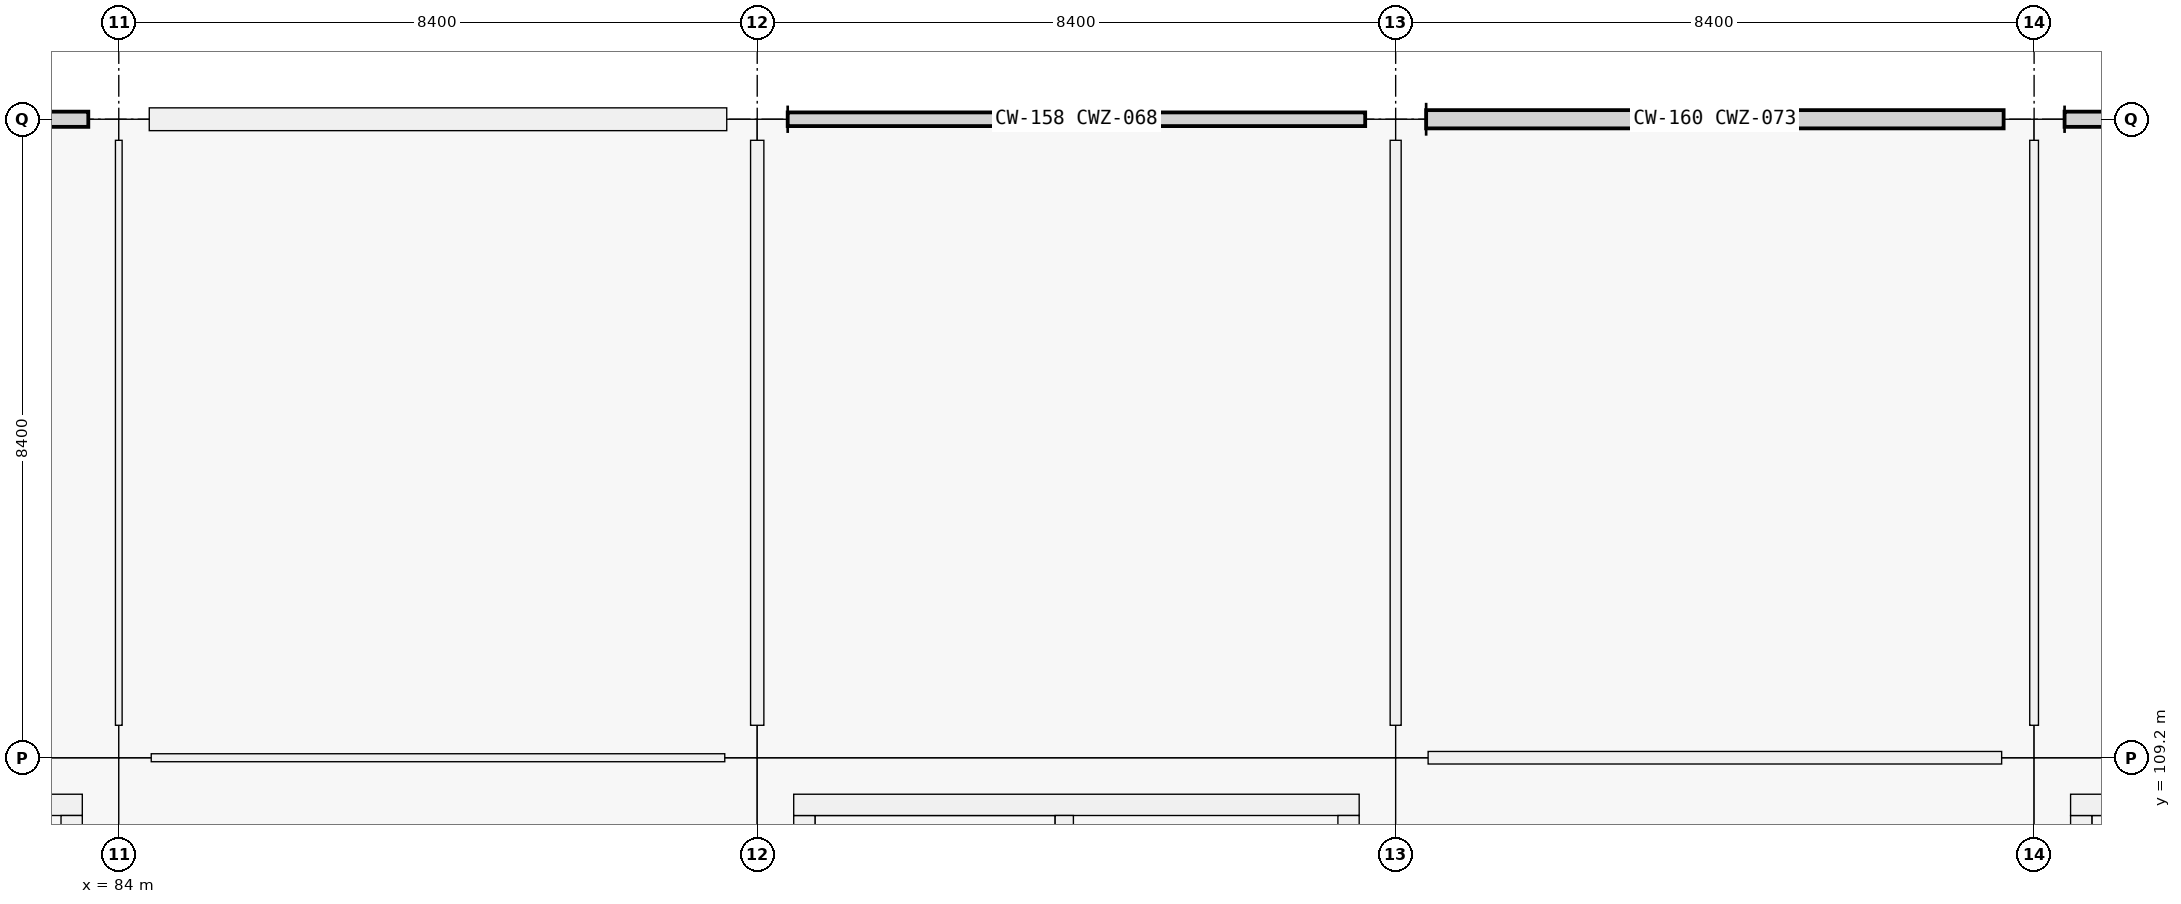
"""IFC4 building model, lengths in metres.
Left out: names, types, materials, properties, quantities, classifications, styles, units other than length and angle.
Written with IfcOpenShell. Run it as: python <this file> out.ifc"""

import sys

from ifc_helpers import new_model, si_unit, direction, frame, frame_2d, origin, origin_2d, place, context, subcontext, project, spatial, rectangle, extrude, element, fill, save


model = new_model("IFC4")
c1 = context("Model", 3, precision=1e-05, world=origin(), true_north=direction((0.0, 1.0)))
c2 = subcontext(c1, "Body", "Model", "MODEL_VIEW")
j1 = project(units=[si_unit("LENGTHUNIT", "METRE"), si_unit("PLANEANGLEUNIT", "RADIAN")], contexts=[c1])
p1 = place(None, origin())
s1 = spatial("IfcSite", under=j1, at=p1, CompositionType="ELEMENT")
p2 = place(p1, origin())
s2 = spatial("IfcBuilding", under=s1, at=p2, CompositionType="ELEMENT")
p3 = place(p2, frame((0.0, 0.0, 10.26)))
s3 = spatial("IfcBuildingStorey", under=s2, at=p3, CompositionType="ELEMENT", Elevation=10.26)
p4 = place(p3, frame((84.0, 109.2, 0.0), z_axis=(0.0, 0.0, 1.0), x_axis=(1.0, 0.0, 0.0)))
e1 = element("IfcColumn", 1, at=p4, inside=s3, PredefinedType="COLUMN", context=c2, shape_type="SweptSolid", body=[
    extrude(rectangle(XDim=0.85, YDim=0.85, at=origin_2d()), origin(), (0.0, 0.0, 1.0), 4.5),
])
p5 = place(p3, frame((84.0, 117.6, 0.0), z_axis=(0.0, 0.0, 1.0), x_axis=(1.0, 0.0, 0.0)))
e2 = element("IfcColumn", 2, at=p5, inside=s3, PredefinedType="COLUMN", context=c2, shape_type="SweptSolid", body=[
    extrude(rectangle(XDim=0.8, YDim=0.55, at=origin_2d()), origin(), (0.0, 0.0, 1.0), 4.5),
])
p6 = place(p3, frame((92.4, 109.2, 0.0), z_axis=(0.0, 0.0, 1.0), x_axis=(1.0, 0.0, 0.0)))
e3 = element("IfcColumn", 3, at=p6, inside=s3, PredefinedType="COLUMN", context=c2, shape_type="SweptSolid", body=[
    extrude(rectangle(XDim=0.85, YDim=0.85, at=origin_2d()), origin(), (0.0, 0.0, 1.0), 4.5),
])
p7 = place(p3, frame((92.4, 117.6, 0.0), z_axis=(0.0, 0.0, 1.0), x_axis=(1.0, 0.0, 0.0)))
e4 = element("IfcColumn", 4, at=p7, inside=s3, PredefinedType="COLUMN", context=c2, shape_type="SweptSolid", body=[
    extrude(rectangle(XDim=0.8, YDim=0.55, at=origin_2d()), origin(), (0.0, 0.0, 1.0), 4.5),
])
p8 = place(p3, frame((100.8, 109.2, 0.0), z_axis=(0.0, 0.0, 1.0), x_axis=(1.0, 0.0, 0.0)))
e5 = element("IfcColumn", 5, at=p8, inside=s3, PredefinedType="COLUMN", context=c2, shape_type="SweptSolid", body=[
    extrude(rectangle(XDim=0.85, YDim=0.85, at=origin_2d()), origin(), (0.0, 0.0, 1.0), 4.5),
])
p9 = place(p3, frame((100.8, 117.6, 0.0), z_axis=(0.0, 0.0, 1.0), x_axis=(1.0, 0.0, 0.0)))
e6 = element("IfcColumn", 6, at=p9, inside=s3, PredefinedType="COLUMN", context=c2, shape_type="SweptSolid", body=[
    extrude(rectangle(XDim=0.8, YDim=0.55, at=origin_2d()), origin(), (0.0, 0.0, 1.0), 4.5),
])
p10 = place(p3, frame((109.2, 109.2, 0.0), z_axis=(0.0, 0.0, 1.0), x_axis=(1.0, 0.0, 0.0)))
e7 = element("IfcColumn", 7, at=p10, inside=s3, PredefinedType="COLUMN", context=c2, shape_type="SweptSolid", body=[
    extrude(rectangle(XDim=0.85, YDim=0.85, at=origin_2d()), origin(), (0.0, 0.0, 1.0), 4.5),
])
p11 = place(p3, frame((109.2, 117.6, 0.0), z_axis=(0.0, 0.0, 1.0), x_axis=(1.0, 0.0, 0.0)))
e8 = element("IfcColumn", 8, at=p11, inside=s3, PredefinedType="COLUMN", context=c2, shape_type="SweptSolid", body=[
    extrude(rectangle(XDim=0.8, YDim=0.55, at=origin_2d()), origin(), (0.0, 0.0, 1.0), 4.5),
])
p12 = place(p3, frame((84.401, 117.6, 0.0), z_axis=(0.0, 0.0, 1.0), x_axis=(1.0, 0.0, 0.0)))
e9 = element("IfcWall", 9, at=p12, inside=s3, PredefinedType="SOLIDWALL", context=c2, shape_type="SweptSolid", body=[
    extrude(rectangle(XDim=7.598, YDim=0.3, at=frame_2d((3.799, 0.0))), origin(), (0.0, 0.0, 1.0), 3.54),
])
p13 = place(p12, frame((2.949, 0.0, 0.9)))
e10 = element("IfcOpeningElement", 10, at=p13, cuts=e9, PredefinedType="OPENING", context=c2, shape_type="SweptSolid", body=[
    extrude(rectangle(XDim=1.7, YDim=1.85, at=frame_2d((0.85, 0.925))), frame((0.0, 0.15, 0.0), z_axis=(0.0, -1.0, 0.0), x_axis=(1.0, 0.0, 0.0)), (0.0, 0.0, 1.0), 0.3),
])
p14 = place(p3, frame((109.82, 101.56, 0.0), z_axis=(0.0, 0.0, 1.0), x_axis=(0.0, 1.0, 0.0)))
e11 = element("IfcWall", 11, at=p14, inside=s3, PredefinedType="SHEAR", context=c2, shape_type="SweptSolid", body=[
    extrude(rectangle(XDim=6.88, YDim=0.28, at=frame_2d((3.44, 0.0))), origin(), (0.0, 0.0, 1.0), 4.5),
])
p15 = place(p3, frame((109.68, 108.58, 0.0), z_axis=(0.0, 0.0, 1.0), x_axis=(1.0, 0.0, 0.0)))
e12 = element("IfcWall", 12, at=p15, inside=s3, PredefinedType="SHEAR", context=c2, shape_type="SweptSolid", body=[
    extrude(rectangle(XDim=7.44, YDim=0.28, at=frame_2d((3.72, 0.0))), origin(), (0.0, 0.0, 1.0), 4.5),
])
p16 = place(p3, frame((76.08, 108.58, 0.0), z_axis=(0.0, 0.0, 1.0), x_axis=(1.0, 0.0, 0.0)))
e13 = element("IfcWall", 13, at=p16, inside=s3, PredefinedType="SHEAR", context=c2, shape_type="SweptSolid", body=[
    extrude(rectangle(XDim=7.44, YDim=0.28, at=frame_2d((3.72, 0.0))), origin(), (0.0, 0.0, 1.0), 4.5),
])
p17 = place(p3, frame((83.38, 108.44, 0.0), z_axis=(0.0, 0.0, 1.0), x_axis=(0.0, -1.0, 0.0)))
e14 = element("IfcWall", 14, at=p17, inside=s3, PredefinedType="SHEAR", context=c2, shape_type="SweptSolid", body=[
    extrude(rectangle(XDim=6.88, YDim=0.28, at=frame_2d((3.44, 0.0))), origin(), (0.0, 0.0, 1.0), 4.5),
])
p18 = place(p17, frame((3.99, 0.0, 0.0)))
e15 = element("IfcOpeningElement", 15, at=p18, cuts=e14, PredefinedType="OPENING", context=c2, shape_type="SweptSolid", body=[
    extrude(rectangle(XDim=1.5, YDim=2.15, at=frame_2d((0.75, 1.075))), frame((0.0, 0.14, 0.0), z_axis=(0.0, -1.0, 0.0), x_axis=(1.0, 0.0, 0.0)), (0.0, 0.0, 1.0), 0.28),
])
p19 = place(p3, frame((93.02, 101.56, 0.0), z_axis=(0.0, 0.0, 1.0), x_axis=(0.0, 1.0, 0.0)))
e16 = element("IfcWall", 16, at=p19, inside=s3, PredefinedType="SHEAR", context=c2, shape_type="SweptSolid", body=[
    extrude(rectangle(XDim=6.88, YDim=0.28, at=frame_2d((3.44, 0.0))), origin(), (0.0, 0.0, 1.0), 4.5),
])
p20 = place(p3, frame((92.88, 108.58, 0.0), z_axis=(0.0, 0.0, 1.0), x_axis=(1.0, 0.0, 0.0)))
e17 = element("IfcWall", 17, at=p20, inside=s3, PredefinedType="SHEAR", context=c2, shape_type="SweptSolid", body=[
    extrude(rectangle(XDim=7.44, YDim=0.28, at=frame_2d((3.72, 0.0))), origin(), (0.0, 0.0, 1.0), 4.5),
])
p21 = place(p3, frame((100.18, 108.44, 0.0), z_axis=(0.0, 0.0, 1.0), x_axis=(0.0, -1.0, 0.0)))
e18 = element("IfcWall", 18, at=p21, inside=s3, PredefinedType="SHEAR", context=c2, shape_type="SweptSolid", body=[
    extrude(rectangle(XDim=6.88, YDim=0.28, at=frame_2d((3.44, 0.0))), origin(), (0.0, 0.0, 1.0), 4.5),
])
p22 = place(p21, frame((3.99, 0.0, 0.0)))
e19 = element("IfcOpeningElement", 19, at=p22, cuts=e18, PredefinedType="OPENING", context=c2, shape_type="SweptSolid", body=[
    extrude(rectangle(XDim=1.5, YDim=2.15, at=frame_2d((0.75, 1.075))), frame((0.0, 0.14, 0.0), z_axis=(0.0, -1.0, 0.0), x_axis=(1.0, 0.0, 0.0)), (0.0, 0.0, 1.0), 0.28),
])
p23 = place(p3, frame((96.44, 101.56, 0.0), z_axis=(0.0, 0.0, 1.0), x_axis=(0.0, 1.0, 0.0)))
e20 = element("IfcWall", 20, at=p23, inside=s3, PredefinedType="SHEAR", context=c2, shape_type="SweptSolid", body=[
    extrude(rectangle(XDim=6.88, YDim=0.24, at=frame_2d((3.44, 0.0))), origin(), (0.0, 0.0, 1.0), 4.5),
])
p24 = place(p23, frame((0.12, 0.0, 0.0)))
e21 = element("IfcOpeningElement", 21, at=p24, cuts=e20, PredefinedType="OPENING", context=c2, shape_type="SweptSolid", body=[
    extrude(rectangle(XDim=1.0, YDim=2.15, at=frame_2d((0.5, 1.075))), frame((0.0, 0.12, 0.0), z_axis=(0.0, -1.0, 0.0), x_axis=(1.0, 0.0, 0.0)), (0.0, 0.0, 1.0), 0.24),
])
p25 = place(p3, frame((84.427, 109.2, 0.0), z_axis=(0.0, 0.0, 1.0), x_axis=(1.0, 0.0, 0.0)))
e22 = element("IfcWall", 22, at=p25, inside=s3, PredefinedType="PARTITIONING", context=c2, shape_type="SweptSolid", body=[
    extrude(rectangle(XDim=7.546, YDim=0.105, at=frame_2d((3.773, 0.0))), origin(), (0.0, 0.0, 1.0), 3.37),
])
p26 = place(p25, frame((3.288, 0.0, 0.0)))
e23 = element("IfcOpeningElement", 23, at=p26, cuts=e22, PredefinedType="OPENING", context=c2, shape_type="SweptSolid", body=[
    extrude(rectangle(XDim=0.97, YDim=2.12, at=frame_2d((0.485, 1.06))), frame((0.0, 0.052, 0.0), z_axis=(0.0, -1.0, 0.0), x_axis=(1.0, 0.0, 0.0)), (0.0, 0.0, 1.0), 0.105),
])
p27 = place(p3, frame((101.227, 109.2, 0.0), z_axis=(0.0, 0.0, 1.0), x_axis=(1.0, 0.0, 0.0)))
e24 = element("IfcWall", 24, at=p27, inside=s3, PredefinedType="PARTITIONING", context=c2, shape_type="SweptSolid", body=[
    extrude(rectangle(XDim=7.546, YDim=0.165, at=frame_2d((3.773, 0.0))), origin(), (0.0, 0.0, 1.0), 3.37),
])
p28 = place(p27, frame((3.273, 0.0, 0.0)))
e25 = element("IfcOpeningElement", 25, at=p28, cuts=e24, PredefinedType="OPENING", context=c2, shape_type="SweptSolid", body=[
    extrude(rectangle(XDim=1.0, YDim=2.2, at=frame_2d((0.5, 1.1))), frame((0.0, 0.083, 0.0), z_axis=(0.0, -1.0, 0.0), x_axis=(1.0, 0.0, 0.0)), (0.0, 0.0, 1.0), 0.165),
])
p29 = place(p3, frame((84.0, 109.627, 0.0), z_axis=(0.0, 0.0, 1.0), x_axis=(0.0, 1.0, 0.0)))
e26 = element("IfcWall", 26, at=p29, inside=s3, PredefinedType="PARTITIONING", context=c2, shape_type="SweptSolid", body=[
    extrude(rectangle(XDim=7.696, YDim=0.088, at=frame_2d((3.848, 0.0))), origin(), (0.0, 0.0, 1.0), 3.37),
])
p30 = place(p29, frame((3.343, 0.0, 0.0)))
e27 = element("IfcOpeningElement", 27, at=p30, cuts=e26, PredefinedType="OPENING", context=c2, shape_type="SweptSolid", body=[
    extrude(rectangle(XDim=1.01, YDim=2.12, at=frame_2d((0.505, 1.06))), frame((0.0, 0.044, 0.0), z_axis=(0.0, -1.0, 0.0), x_axis=(1.0, 0.0, 0.0)), (0.0, 0.0, 1.0), 0.088),
])
p31 = place(p3, frame((92.4, 109.627, 0.0), z_axis=(0.0, 0.0, 1.0), x_axis=(0.0, 1.0, 0.0)))
e28 = element("IfcWall", 28, at=p31, inside=s3, PredefinedType="PARTITIONING", context=c2, shape_type="SweptSolid", body=[
    extrude(rectangle(XDim=7.696, YDim=0.175, at=frame_2d((3.848, 0.0))), origin(), (0.0, 0.0, 1.0), 3.37),
])
p32 = place(p31, frame((3.363, 0.0, 0.0)))
e29 = element("IfcOpeningElement", 29, at=p32, cuts=e28, PredefinedType="OPENING", context=c2, shape_type="SweptSolid", body=[
    extrude(rectangle(XDim=0.97, YDim=2.12, at=frame_2d((0.485, 1.06))), frame((0.0, 0.087, 0.0), z_axis=(0.0, -1.0, 0.0), x_axis=(1.0, 0.0, 0.0)), (0.0, 0.0, 1.0), 0.175),
])
p33 = place(p3, frame((100.8, 109.627, 0.0), z_axis=(0.0, 0.0, 1.0), x_axis=(0.0, 1.0, 0.0)))
e30 = element("IfcWall", 30, at=p33, inside=s3, PredefinedType="PARTITIONING", context=c2, shape_type="SweptSolid", body=[
    extrude(rectangle(XDim=7.696, YDim=0.145, at=frame_2d((3.848, 0.0))), origin(), (0.0, 0.0, 1.0), 3.37),
])
p34 = place(p33, frame((3.388, 0.0, 0.0)))
e31 = element("IfcOpeningElement", 31, at=p34, cuts=e30, PredefinedType="OPENING", context=c2, shape_type="SweptSolid", body=[
    extrude(rectangle(XDim=0.92, YDim=2.15, at=frame_2d((0.46, 1.075))), frame((0.0, 0.073, 0.0), z_axis=(0.0, -1.0, 0.0), x_axis=(1.0, 0.0, 0.0)), (0.0, 0.0, 1.0), 0.145),
])
p35 = place(p3, frame((109.2, 109.627, 0.0), z_axis=(0.0, 0.0, 1.0), x_axis=(0.0, 1.0, 0.0)))
e32 = element("IfcWall", 32, at=p35, inside=s3, PredefinedType="PARTITIONING", context=c2, shape_type="SweptSolid", body=[
    extrude(rectangle(XDim=7.696, YDim=0.115, at=frame_2d((3.848, 0.0))), origin(), (0.0, 0.0, 1.0), 3.37),
])
p36 = place(p35, frame((3.383, 0.0, 0.0)))
e33 = element("IfcOpeningElement", 33, at=p36, cuts=e32, PredefinedType="OPENING", context=c2, shape_type="SweptSolid", body=[
    extrude(rectangle(XDim=0.93, YDim=2.12, at=frame_2d((0.465, 1.06))), frame((0.0, 0.058, 0.0), z_axis=(0.0, -1.0, 0.0), x_axis=(1.0, 0.0, 0.0)), (0.0, 0.0, 1.0), 0.115),
])
p37 = place(p13, origin())
e34 = element("IfcWindow", 34, at=p37, inside=s3, PartitioningType="SINGLE_PANEL", PredefinedType="WINDOW", context=c2, shape_type="SweptSolid", body=[
    extrude(rectangle(XDim=1.7, YDim=1.85, at=frame_2d((0.85, 0.925))), frame((0.0, 0.03, 0.0), z_axis=(0.0, -1.0, 0.0), x_axis=(1.0, 0.0, 0.0)), (0.0, 0.0, 1.0), 0.06),
])
fill(e10, e34)
p38 = place(p26, origin())
e35 = element("IfcDoor", 35, at=p38, inside=s3, OperationType="SINGLE_SWING_LEFT", PredefinedType="DOOR", context=c2, shape_type="SweptSolid", body=[
    extrude(rectangle(XDim=0.97, YDim=2.12, at=frame_2d((0.485, 1.06))), frame((0.0, 0.025, 0.0), z_axis=(0.0, -1.0, 0.0), x_axis=(1.0, 0.0, 0.0)), (0.0, 0.0, 1.0), 0.05),
])
fill(e23, e35)
p39 = place(p28, origin())
e36 = element("IfcDoor", 36, at=p39, inside=s3, OperationType="SINGLE_SWING_RIGHT", PredefinedType="DOOR", context=c2, shape_type="SweptSolid", body=[
    extrude(rectangle(XDim=1.0, YDim=2.2, at=frame_2d((0.5, 1.1))), frame((0.0, 0.025, 0.0), z_axis=(0.0, -1.0, 0.0), x_axis=(1.0, 0.0, 0.0)), (0.0, 0.0, 1.0), 0.05),
])
fill(e25, e36)
p40 = place(p30, origin())
e37 = element("IfcDoor", 37, at=p40, inside=s3, OperationType="SINGLE_SWING_RIGHT", PredefinedType="DOOR", context=c2, shape_type="SweptSolid", body=[
    extrude(rectangle(XDim=1.01, YDim=2.12, at=frame_2d((0.505, 1.06))), frame((0.0, 0.025, 0.0), z_axis=(0.0, -1.0, 0.0), x_axis=(1.0, 0.0, 0.0)), (0.0, 0.0, 1.0), 0.05),
])
fill(e27, e37)
p41 = place(p32, origin())
e38 = element("IfcDoor", 38, at=p41, inside=s3, OperationType="SINGLE_SWING_LEFT", PredefinedType="DOOR", context=c2, shape_type="SweptSolid", body=[
    extrude(rectangle(XDim=0.97, YDim=2.12, at=frame_2d((0.485, 1.06))), frame((0.0, 0.025, 0.0), z_axis=(0.0, -1.0, 0.0), x_axis=(1.0, 0.0, 0.0)), (0.0, 0.0, 1.0), 0.05),
])
fill(e29, e38)
p42 = place(p36, origin())
e39 = element("IfcDoor", 39, at=p42, inside=s3, OperationType="SINGLE_SWING_RIGHT", PredefinedType="DOOR", context=c2, shape_type="SweptSolid", body=[
    extrude(rectangle(XDim=0.93, YDim=2.12, at=frame_2d((0.465, 1.06))), frame((0.0, 0.025, 0.0), z_axis=(0.0, -1.0, 0.0), x_axis=(1.0, 0.0, 0.0)), (0.0, 0.0, 1.0), 0.05),
])
fill(e33, e39)
p43 = place(p34, origin())
e40 = element("IfcDoor", 40, at=p43, inside=s3, OperationType="SINGLE_SWING_RIGHT", PredefinedType="DOOR", context=c2, shape_type="SweptSolid", body=[
    extrude(rectangle(XDim=0.92, YDim=2.15, at=frame_2d((0.46, 1.075))), frame((0.0, 0.025, 0.0), z_axis=(0.0, -1.0, 0.0), x_axis=(1.0, 0.0, 0.0)), (0.0, 0.0, 1.0), 0.05),
])
fill(e31, e40)
save(model, sys.argv[1])
